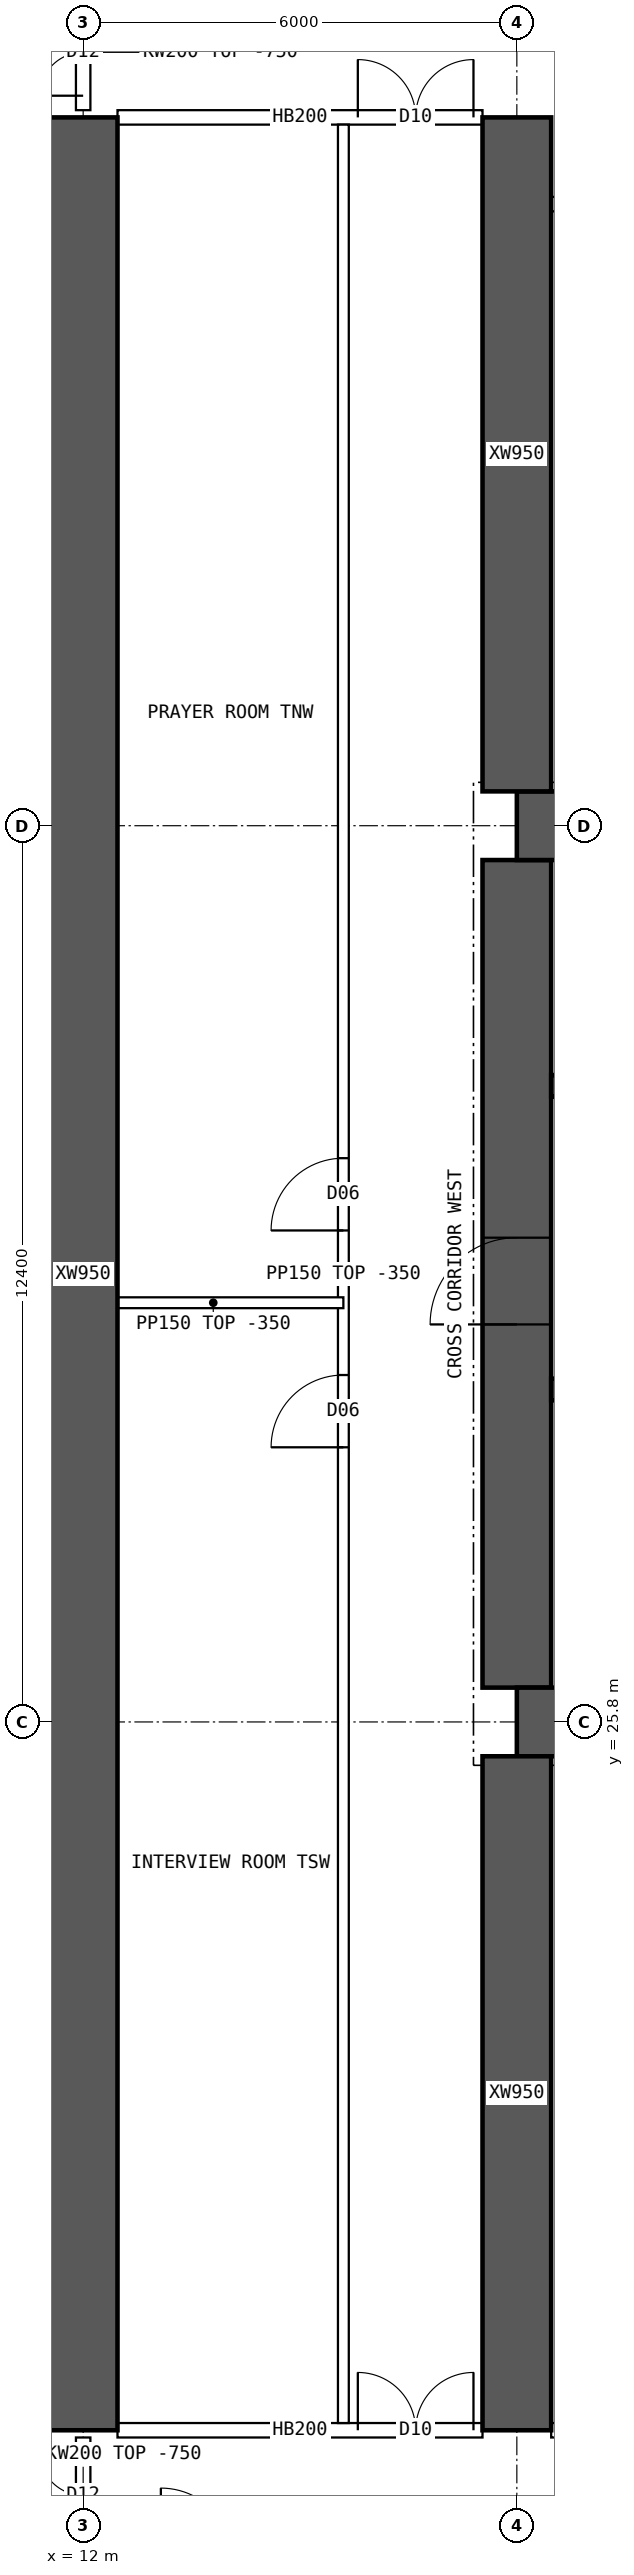
"""IFC4 building model, lengths in metres.
Left out: names, types, materials, properties, quantities, classifications, styles, units other than length and angle.
Written with IfcOpenShell. Run it as: python <this file> out.ifc"""

import sys

from ifc_helpers import new_model, si_unit, direction, frame, frame_2d, origin, place, context, subcontext, project, spatial, polyline, rectangle, outline, extrude, element, fill, save


model = new_model("IFC4")
c1 = context("Model", 3, precision=1e-05, world=origin(), true_north=direction((0.0, 1.0)))
c2 = subcontext(c1, "Body", "Model", "MODEL_VIEW")
j1 = project(units=[si_unit("LENGTHUNIT", "METRE"), si_unit("PLANEANGLEUNIT", "RADIAN")], contexts=[c1])
p1 = place(None, origin())
s1 = spatial("IfcSite", under=j1, at=p1, CompositionType="ELEMENT")
p2 = place(p1, origin())
s2 = spatial("IfcBuilding", under=s1, at=p2, CompositionType="ELEMENT")
p3 = place(p2, frame((0.0, 0.0, 129.4)))
s3 = spatial("IfcBuildingStorey", under=s2, at=p3, CompositionType="ELEMENT", Elevation=129.4)
for number, where, z_axis, x_axis in (
    (1, (18.0, 25.8, 0.0), (0.0, 0.0, 1.0), (1.0, 0.0, 0.0)),
    (2, (18.0, 38.2, 0.0), (0.0, 0.0, 1.0), (1.0, 0.0, 0.0)),
):
    element("IfcWall", number, at=place(p3, frame(where, z_axis=z_axis, x_axis=x_axis)), inside=s3, PredefinedType="SHEAR", context=c2, shape_type="SweptSolid", body=[
        extrude(rectangle(XDim=48.0, YDim=0.95, at=frame_2d((24.0, 0.0))), origin(), (0.0, 0.0, 1.0), 3.75),
    ])
p4 = place(p3, frame((18.0, 26.275, 0.0), z_axis=(0.0, 0.0, 1.0), x_axis=(0.0, 1.0, 0.0)))
e3 = element("IfcWall", 3, at=p4, inside=s3, PredefinedType="SHEAR", context=c2, shape_type="SweptSolid", body=[
    extrude(rectangle(XDim=11.45, YDim=0.95, at=frame_2d((5.725, 0.0))), origin(), (0.0, 0.0, 1.0), 3.75),
])
p5 = place(p4, frame((5.025, 0.0, 0.0)))
e4 = element("IfcOpeningElement", 4, at=p5, cuts=e3, PredefinedType="OPENING", context=c2, shape_type="SweptSolid", body=[
    extrude(rectangle(XDim=1.2, YDim=2.1, at=frame_2d((0.6, 1.05))), frame((0.0, 0.485, 0.0), z_axis=(0.0, -1.0, 0.0), x_axis=(1.0, 0.0, 0.0)), (0.0, 0.0, 1.0), 0.97),
])
p6 = place(p3, frame((18.475, 30.4, 0.0), z_axis=(0.0, 0.0, 1.0), x_axis=(1.0, 0.0, 0.0)))
e5 = element("IfcWall", 5, at=p6, inside=s3, PredefinedType="SHEAR", context=c2, shape_type="SweptSolid", body=[
    extrude(rectangle(XDim=47.05, YDim=0.3, at=frame_2d((23.525, 0.0))), origin(), (0.0, 0.0, 1.0), 3.75),
])
p7 = place(p6, frame((0.4, 0.0, 0.0)))
e6 = element("IfcOpeningElement", 6, at=p7, cuts=e5, PredefinedType="OPENING", context=c2, shape_type="SweptSolid", body=[
    extrude(rectangle(XDim=1.0, YDim=2.1, at=frame_2d((0.5, 1.05))), frame((0.0, 0.16, 0.0), z_axis=(0.0, -1.0, 0.0), x_axis=(1.0, 0.0, 0.0)), (0.0, 0.0, 1.0), 0.32),
])
p8 = place(p6, frame((45.65, 0.0, 0.0)))
e7 = element("IfcOpeningElement", 7, at=p8, cuts=e5, PredefinedType="OPENING", context=c2, shape_type="SweptSolid", body=[
    extrude(rectangle(XDim=1.0, YDim=2.1, at=frame_2d((0.5, 1.05))), frame((0.0, 0.16, 0.0), z_axis=(0.0, -1.0, 0.0), x_axis=(1.0, 0.0, 0.0)), (0.0, 0.0, 1.0), 0.32),
])
p9 = place(p6, frame((8.275, 0.0, 0.0)))
e8 = element("IfcOpeningElement", 8, at=p9, cuts=e5, PredefinedType="OPENING", context=c2, shape_type="SweptSolid", body=[
    extrude(rectangle(XDim=1.1, YDim=2.1, at=frame_2d((0.55, 1.05))), frame((0.0, 0.16, 0.0), z_axis=(0.0, -1.0, 0.0), x_axis=(1.0, 0.0, 0.0)), (0.0, 0.0, 1.0), 0.32),
])
p10 = place(p6, frame((10.875, 0.0, 0.0)))
e9 = element("IfcOpeningElement", 9, at=p10, cuts=e5, PredefinedType="OPENING", context=c2, shape_type="SweptSolid", body=[
    extrude(rectangle(XDim=1.1, YDim=2.1, at=frame_2d((0.55, 1.05))), frame((0.0, 0.16, 0.0), z_axis=(0.0, -1.0, 0.0), x_axis=(1.0, 0.0, 0.0)), (0.0, 0.0, 1.0), 0.32),
])
p11 = place(p6, frame((13.475, 0.0, 0.0)))
e10 = element("IfcOpeningElement", 10, at=p11, cuts=e5, PredefinedType="OPENING", context=c2, shape_type="SweptSolid", body=[
    extrude(rectangle(XDim=1.1, YDim=2.1, at=frame_2d((0.55, 1.05))), frame((0.0, 0.16, 0.0), z_axis=(0.0, -1.0, 0.0), x_axis=(1.0, 0.0, 0.0)), (0.0, 0.0, 1.0), 0.32),
])
p12 = place(p6, frame((16.075, 0.0, 0.0)))
e11 = element("IfcOpeningElement", 11, at=p12, cuts=e5, PredefinedType="OPENING", context=c2, shape_type="SweptSolid", body=[
    extrude(rectangle(XDim=1.1, YDim=2.1, at=frame_2d((0.55, 1.05))), frame((0.0, 0.16, 0.0), z_axis=(0.0, -1.0, 0.0), x_axis=(1.0, 0.0, 0.0)), (0.0, 0.0, 1.0), 0.32),
])
p13 = place(p6, frame((18.85, 0.0, 0.0)))
e12 = element("IfcOpeningElement", 12, at=p13, cuts=e5, PredefinedType="OPENING", context=c2, shape_type="SweptSolid", body=[
    extrude(rectangle(XDim=0.9, YDim=2.1, at=frame_2d((0.45, 1.05))), frame((0.0, 0.16, 0.0), z_axis=(0.0, -1.0, 0.0), x_axis=(1.0, 0.0, 0.0)), (0.0, 0.0, 1.0), 0.32),
])
p14 = place(p6, frame((30.142, 0.0, 0.0)))
e13 = element("IfcOpeningElement", 13, at=p14, cuts=e5, PredefinedType="OPENING", context=c2, shape_type="SweptSolid", body=[
    extrude(rectangle(XDim=1.1, YDim=2.1, at=frame_2d((0.55, 1.05))), frame((0.0, 0.16, 0.0), z_axis=(0.0, -1.0, 0.0), x_axis=(1.0, 0.0, 0.0)), (0.0, 0.0, 1.0), 0.32),
])
p15 = place(p6, frame((33.675, 0.0, 0.0)))
e14 = element("IfcOpeningElement", 14, at=p15, cuts=e5, PredefinedType="OPENING", context=c2, shape_type="SweptSolid", body=[
    extrude(rectangle(XDim=1.1, YDim=2.1, at=frame_2d((0.55, 1.05))), frame((0.0, 0.16, 0.0), z_axis=(0.0, -1.0, 0.0), x_axis=(1.0, 0.0, 0.0)), (0.0, 0.0, 1.0), 0.32),
])
p16 = place(p6, frame((37.208, 0.0, 0.0)))
e15 = element("IfcOpeningElement", 15, at=p16, cuts=e5, PredefinedType="OPENING", context=c2, shape_type="SweptSolid", body=[
    extrude(rectangle(XDim=1.1, YDim=2.1, at=frame_2d((0.55, 1.05))), frame((0.0, 0.16, 0.0), z_axis=(0.0, -1.0, 0.0), x_axis=(1.0, 0.0, 0.0)), (0.0, 0.0, 1.0), 0.32),
])
p17 = place(p3, frame((18.475, 34.6, 0.0), z_axis=(0.0, 0.0, 1.0), x_axis=(1.0, 0.0, 0.0)))
e16 = element("IfcWall", 16, at=p17, inside=s3, PredefinedType="SHEAR", context=c2, shape_type="SweptSolid", body=[
    extrude(rectangle(XDim=47.05, YDim=0.3, at=frame_2d((23.525, 0.0))), origin(), (0.0, 0.0, 1.0), 3.75),
])
p18 = place(p17, frame((0.9, 0.0, 0.0)))
e17 = element("IfcOpeningElement", 17, at=p18, cuts=e16, PredefinedType="OPENING", context=c2, shape_type="SweptSolid", body=[
    extrude(rectangle(XDim=1.1, YDim=2.1, at=frame_2d((0.55, 1.05))), frame((0.0, 0.16, 0.0), z_axis=(0.0, -1.0, 0.0), x_axis=(1.0, 0.0, 0.0)), (0.0, 0.0, 1.0), 0.32),
])
p19 = place(p17, frame((45.05, 0.0, 0.0)))
e18 = element("IfcOpeningElement", 18, at=p19, cuts=e16, PredefinedType="OPENING", context=c2, shape_type="SweptSolid", body=[
    extrude(rectangle(XDim=1.1, YDim=2.1, at=frame_2d((0.55, 1.05))), frame((0.0, 0.16, 0.0), z_axis=(0.0, -1.0, 0.0), x_axis=(1.0, 0.0, 0.0)), (0.0, 0.0, 1.0), 0.32),
])
p20 = place(p17, frame((4.125, 0.0, 0.0)))
e19 = element("IfcOpeningElement", 19, at=p20, cuts=e16, PredefinedType="OPENING", context=c2, shape_type="SweptSolid", body=[
    extrude(rectangle(XDim=0.9, YDim=2.1, at=frame_2d((0.45, 1.05))), frame((0.0, 0.16, 0.0), z_axis=(0.0, -1.0, 0.0), x_axis=(1.0, 0.0, 0.0)), (0.0, 0.0, 1.0), 0.32),
])
p21 = place(p17, frame((42.025, 0.0, 0.0)))
e20 = element("IfcOpeningElement", 20, at=p21, cuts=e16, PredefinedType="OPENING", context=c2, shape_type="SweptSolid", body=[
    extrude(rectangle(XDim=0.9, YDim=2.1, at=frame_2d((0.45, 1.05))), frame((0.0, 0.16, 0.0), z_axis=(0.0, -1.0, 0.0), x_axis=(1.0, 0.0, 0.0)), (0.0, 0.0, 1.0), 0.32),
])
p22 = place(p17, frame((8.9, 0.0, 0.0)))
e21 = element("IfcOpeningElement", 21, at=p22, cuts=e16, PredefinedType="OPENING", context=c2, shape_type="SweptSolid", body=[
    extrude(rectangle(XDim=0.9, YDim=2.1, at=frame_2d((0.45, 1.05))), frame((0.0, 0.16, 0.0), z_axis=(0.0, -1.0, 0.0), x_axis=(1.0, 0.0, 0.0)), (0.0, 0.0, 1.0), 0.32),
])
p23 = place(p17, frame((12.874, 0.0, 0.0)))
e22 = element("IfcOpeningElement", 22, at=p23, cuts=e16, PredefinedType="OPENING", context=c2, shape_type="SweptSolid", body=[
    extrude(rectangle(XDim=0.9, YDim=2.1, at=frame_2d((0.45, 1.05))), frame((0.0, 0.16, 0.0), z_axis=(0.0, -1.0, 0.0), x_axis=(1.0, 0.0, 0.0)), (0.0, 0.0, 1.0), 0.32),
])
p24 = place(p17, frame((16.521, 0.0, 0.0)))
e23 = element("IfcOpeningElement", 23, at=p24, cuts=e16, PredefinedType="OPENING", context=c2, shape_type="SweptSolid", body=[
    extrude(rectangle(XDim=0.9, YDim=2.1, at=frame_2d((0.45, 1.05))), frame((0.0, 0.16, 0.0), z_axis=(0.0, -1.0, 0.0), x_axis=(1.0, 0.0, 0.0)), (0.0, 0.0, 1.0), 0.32),
])
p25 = place(p17, frame((20.28, 0.0, 0.0)))
e24 = element("IfcOpeningElement", 24, at=p25, cuts=e16, PredefinedType="OPENING", context=c2, shape_type="SweptSolid", body=[
    extrude(rectangle(XDim=0.9, YDim=2.1, at=frame_2d((0.45, 1.05))), frame((0.0, 0.16, 0.0), z_axis=(0.0, -1.0, 0.0), x_axis=(1.0, 0.0, 0.0)), (0.0, 0.0, 1.0), 0.32),
])
p26 = place(p17, frame((24.686, 0.0, 0.0)))
e25 = element("IfcOpeningElement", 25, at=p26, cuts=e16, PredefinedType="OPENING", context=c2, shape_type="SweptSolid", body=[
    extrude(rectangle(XDim=0.9, YDim=2.1, at=frame_2d((0.45, 1.05))), frame((0.0, 0.16, 0.0), z_axis=(0.0, -1.0, 0.0), x_axis=(1.0, 0.0, 0.0)), (0.0, 0.0, 1.0), 0.32),
])
p27 = place(p17, frame((27.483, 0.0, 0.0)))
e26 = element("IfcOpeningElement", 26, at=p27, cuts=e16, PredefinedType="OPENING", context=c2, shape_type="SweptSolid", body=[
    extrude(rectangle(XDim=0.9, YDim=2.1, at=frame_2d((0.45, 1.05))), frame((0.0, 0.16, 0.0), z_axis=(0.0, -1.0, 0.0), x_axis=(1.0, 0.0, 0.0)), (0.0, 0.0, 1.0), 0.32),
])
p28 = place(p17, frame((33.604, 0.0, 0.0)))
e27 = element("IfcOpeningElement", 27, at=p28, cuts=e16, PredefinedType="OPENING", context=c2, shape_type="SweptSolid", body=[
    extrude(rectangle(XDim=0.9, YDim=2.1, at=frame_2d((0.45, 1.05))), frame((0.0, 0.16, 0.0), z_axis=(0.0, -1.0, 0.0), x_axis=(1.0, 0.0, 0.0)), (0.0, 0.0, 1.0), 0.32),
])
p29 = place(p3, frame((12.0, 16.0, 0.0), z_axis=(0.0, 0.0, 1.0), x_axis=(0.0, 1.0, 0.0)))
e28 = element("IfcWall", 28, at=p29, inside=s3, PredefinedType="SHEAR", context=c2, shape_type="SweptSolid", body=[
    extrude(rectangle(XDim=32.0, YDim=0.95, at=frame_2d((16.0, 0.0))), origin(), (0.0, 0.0, 1.0), 3.75),
])
for number, where, z_axis, x_axis in (
    (29, (18.0, 16.0, 0.0), (0.0, 0.0, 1.0), (0.0, 1.0, 0.0)),
    (30, (18.0, 38.675, 0.0), (0.0, 0.0, 1.0), (0.0, 1.0, 0.0)),
):
    element("IfcWall", number, at=place(p3, frame(where, z_axis=z_axis, x_axis=x_axis)), inside=s3, PredefinedType="SHEAR", context=c2, shape_type="SweptSolid", body=[
        extrude(rectangle(XDim=9.325, YDim=0.95, at=frame_2d((4.663, 0.0))), origin(), (0.0, 0.0, 1.0), 3.75),
    ])
p30 = place(p3, frame((12.475, 16.0, 0.0), z_axis=(0.0, 0.0, 1.0), x_axis=(1.0, 0.0, 0.0)))
e31 = element("IfcWall", 31, at=p30, inside=s3, PredefinedType="SOLIDWALL", context=c2, shape_type="SweptSolid", body=[
    extrude(rectangle(XDim=5.05, YDim=0.2, at=frame_2d((2.525, 0.0))), origin(), (0.0, 0.0, 1.0), 3.4),
])
p31 = place(p30, frame((3.325, 0.0, 0.0)))
e32 = element("IfcOpeningElement", 32, at=p31, cuts=e31, PredefinedType="OPENING", context=c2, shape_type="SweptSolid", body=[
    extrude(rectangle(XDim=1.6, YDim=2.1, at=frame_2d((0.8, 1.05))), frame((0.0, 0.11, 0.0), z_axis=(0.0, -1.0, 0.0), x_axis=(1.0, 0.0, 0.0)), (0.0, 0.0, 1.0), 0.22),
])
p32 = place(p3, frame((18.475, 16.0, 0.0), z_axis=(0.0, 0.0, 1.0), x_axis=(1.0, 0.0, 0.0)))
e33 = element("IfcWall", 33, at=p32, inside=s3, PredefinedType="SOLIDWALL", context=c2, shape_type="SweptSolid", body=[
    extrude(rectangle(XDim=5.05, YDim=0.2, at=frame_2d((2.525, 0.0))), origin(), (0.0, 0.0, 1.0), 3.4),
])
p33 = place(p32, frame((0.35, 0.0, 0.0)))
e34 = element("IfcOpeningElement", 34, at=p33, cuts=e33, PredefinedType="OPENING", context=c2, shape_type="SweptSolid", body=[
    extrude(rectangle(XDim=0.9, YDim=2.1, at=frame_2d((0.45, 1.05))), frame((0.0, 0.11, 0.0), z_axis=(0.0, -1.0, 0.0), x_axis=(1.0, 0.0, 0.0)), (0.0, 0.0, 1.0), 0.22),
])
p34 = place(p32, frame((3.215, 0.0, 0.0)))
e35 = element("IfcOpeningElement", 35, at=p34, cuts=e33, PredefinedType="OPENING", context=c2, shape_type="SweptSolid", body=[
    extrude(rectangle(XDim=0.9, YDim=2.1, at=frame_2d((0.45, 1.05))), frame((0.0, 0.11, 0.0), z_axis=(0.0, -1.0, 0.0), x_axis=(1.0, 0.0, 0.0)), (0.0, 0.0, 1.0), 0.22),
])
p35 = place(p3, frame((12.475, 48.0, 0.0), z_axis=(0.0, 0.0, 1.0), x_axis=(1.0, 0.0, 0.0)))
e36 = element("IfcWall", 36, at=p35, inside=s3, PredefinedType="SOLIDWALL", context=c2, shape_type="SweptSolid", body=[
    extrude(rectangle(XDim=5.05, YDim=0.2, at=frame_2d((2.525, 0.0))), origin(), (0.0, 0.0, 1.0), 3.4),
])
p36 = place(p35, frame((3.325, 0.0, 0.0)))
e37 = element("IfcOpeningElement", 37, at=p36, cuts=e36, PredefinedType="OPENING", context=c2, shape_type="SweptSolid", body=[
    extrude(rectangle(XDim=1.6, YDim=2.1, at=frame_2d((0.8, 1.05))), frame((0.0, 0.11, 0.0), z_axis=(0.0, -1.0, 0.0), x_axis=(1.0, 0.0, 0.0)), (0.0, 0.0, 1.0), 0.22),
])
p37 = place(p3, frame((18.475, 46.8, 0.0), z_axis=(0.0, 0.0, 1.0), x_axis=(1.0, 0.0, 0.0)))
e38 = element("IfcWall", 38, at=p37, inside=s3, PredefinedType="SOLIDWALL", context=c2, shape_type="SweptSolid", body=[
    extrude(rectangle(XDim=5.05, YDim=0.2, at=frame_2d((2.525, 0.0))), origin(), (0.0, 0.0, 1.0), 3.4),
])
p38 = place(p37, frame((0.8, 0.0, 0.0)))
e39 = element("IfcOpeningElement", 39, at=p38, cuts=e38, PredefinedType="OPENING", context=c2, shape_type="SweptSolid", body=[
    extrude(rectangle(XDim=1.0, YDim=2.1, at=frame_2d((0.5, 1.05))), frame((0.0, 0.11, 0.0), z_axis=(0.0, -1.0, 0.0), x_axis=(1.0, 0.0, 0.0)), (0.0, 0.0, 1.0), 0.22),
])
p39 = place(p3, frame((15.6, 16.1, 0.0), z_axis=(0.0, 0.0, 1.0), x_axis=(0.0, 1.0, 0.0)))
e40 = element("IfcWall", 40, at=p39, inside=s3, PredefinedType="PARTITIONING", context=c2, shape_type="SweptSolid", body=[
    extrude(rectangle(XDim=31.8, YDim=0.15, at=frame_2d((15.9, 0.0))), origin(), (0.0, 0.0, 1.0), 3.4),
])
p40 = place(p39, frame((13.5, 0.0, 0.0)))
e41 = element("IfcOpeningElement", 41, at=p40, cuts=e40, PredefinedType="OPENING", context=c2, shape_type="SweptSolid", body=[
    extrude(rectangle(XDim=1.0, YDim=2.1, at=frame_2d((0.5, 1.05))), frame((0.0, 0.085, 0.0), z_axis=(0.0, -1.0, 0.0), x_axis=(1.0, 0.0, 0.0)), (0.0, 0.0, 1.0), 0.17),
])
p41 = place(p39, frame((16.5, 0.0, 0.0)))
e42 = element("IfcOpeningElement", 42, at=p41, cuts=e40, PredefinedType="OPENING", context=c2, shape_type="SweptSolid", body=[
    extrude(rectangle(XDim=1.0, YDim=2.1, at=frame_2d((0.5, 1.05))), frame((0.0, 0.085, 0.0), z_axis=(0.0, -1.0, 0.0), x_axis=(1.0, 0.0, 0.0)), (0.0, 0.0, 1.0), 0.17),
])
p42 = place(p3, frame((12.0, 31.6, 0.0), z_axis=(0.0, 0.0, 1.0), x_axis=(1.0, 0.0, 0.0)))
e43 = element("IfcWall", 43, at=p42, inside=s3, PredefinedType="PARTITIONING", context=c2, shape_type="SweptSolid", body=[
    extrude(rectangle(XDim=3.6, YDim=0.15, at=frame_2d((1.8, 0.0))), origin(), (0.0, 0.0, 1.0), 3.4),
])
p43 = place(p3, frame((3.905, 30.85, 0.0), z_axis=(0.0, 0.0, 1.0), x_axis=(1.0, 0.0, 0.0)))
e44 = element("IfcWall", 44, at=p43, inside=s3, PredefinedType="PARTITIONING", context=c2, shape_type="SweptSolid", body=[
    extrude(outline(polyline([(0.0, 0.0), (8.02, 0.0), (8.02, 3.4), (2.397, 3.4), (2.395, 2.95), (1.797, 2.95), (1.795, 3.4), (0.0, 3.4), (0.0, 0.0)])), frame((0.0, 0.075, 0.0), z_axis=(0.0, -1.0, 0.0), x_axis=(1.0, 0.0, 0.0)), (0.0, 0.0, 1.0), 0.15),
])
p44 = place(p3, frame((12.0, 14.3, 0.0), z_axis=(0.0, 0.0, 1.0), x_axis=(0.0, 1.0, 0.0)))
e45 = element("IfcWall", 45, at=p44, inside=s3, PredefinedType="SOLIDWALL", context=c2, shape_type="SweptSolid", body=[
    extrude(outline(polyline([(0.0, 0.0), (1.6, 0.0), (1.6, 3.0), (0.0, 3.0), (0.0, 0.0)])), frame((0.0, 0.1, 0.0), z_axis=(0.0, -1.0, 0.0), x_axis=(1.0, 0.0, 0.0)), (0.0, 0.0, 1.0), 0.2),
])
p45 = place(p44, frame((0.2, 0.0, 0.0)))
e46 = element("IfcOpeningElement", 46, at=p45, cuts=e45, PredefinedType="OPENING", context=c2, shape_type="SweptSolid", body=[
    extrude(rectangle(XDim=1.2, YDim=2.1, at=frame_2d((0.6, 1.05))), frame((0.0, 0.11, 0.0), z_axis=(0.0, -1.0, 0.0), x_axis=(1.0, 0.0, 0.0)), (0.0, 0.0, 1.0), 0.22),
])
p46 = place(p3, frame((12.0, 48.1, 0.0), z_axis=(0.0, 0.0, 1.0), x_axis=(0.0, 1.0, 0.0)))
e47 = element("IfcWall", 47, at=p46, inside=s3, PredefinedType="SOLIDWALL", context=c2, shape_type="SweptSolid", body=[
    extrude(outline(polyline([(0.0, 0.0), (1.6, 0.0), (1.6, 3.0), (0.0, 3.0), (0.0, 0.0)])), frame((0.0, 0.1, 0.0), z_axis=(0.0, -1.0, 0.0), x_axis=(1.0, 0.0, 0.0)), (0.0, 0.0, 1.0), 0.2),
])
p47 = place(p46, frame((0.2, 0.0, 0.0)))
e48 = element("IfcOpeningElement", 48, at=p47, cuts=e47, PredefinedType="OPENING", context=c2, shape_type="SweptSolid", body=[
    extrude(rectangle(XDim=1.2, YDim=2.1, at=frame_2d((0.6, 1.05))), frame((0.0, 0.11, 0.0), z_axis=(0.0, -1.0, 0.0), x_axis=(1.0, 0.0, 0.0)), (0.0, 0.0, 1.0), 0.22),
])
p48 = place(p5, origin())
e49 = element("IfcDoor", 49, at=p48, inside=s3, OperationType="SINGLE_SWING_LEFT", PredefinedType="DOOR", context=c2, shape_type="SweptSolid", body=[
    extrude(rectangle(XDim=1.2, YDim=2.1, at=frame_2d((0.6, 1.05))), frame((0.0, 0.025, 0.0), z_axis=(0.0, -1.0, 0.0), x_axis=(1.0, 0.0, 0.0)), (0.0, 0.0, 1.0), 0.05),
])
fill(e4, e49)
p49 = place(p31, origin())
e50 = element("IfcDoor", 50, at=p49, inside=s3, OperationType="DOUBLE_DOOR_SINGLE_SWING", PredefinedType="DOOR", context=c2, shape_type="SweptSolid", body=[
    extrude(rectangle(XDim=1.6, YDim=2.1, at=frame_2d((0.8, 1.05))), frame((0.0, 0.025, 0.0), z_axis=(0.0, -1.0, 0.0), x_axis=(1.0, 0.0, 0.0)), (0.0, 0.0, 1.0), 0.05),
])
fill(e32, e50)
p50 = place(p36, origin())
e51 = element("IfcDoor", 51, at=p50, inside=s3, OperationType="DOUBLE_DOOR_SINGLE_SWING", PredefinedType="DOOR", context=c2, shape_type="SweptSolid", body=[
    extrude(rectangle(XDim=1.6, YDim=2.1, at=frame_2d((0.8, 1.05))), frame((0.0, 0.025, 0.0), z_axis=(0.0, -1.0, 0.0), x_axis=(1.0, 0.0, 0.0)), (0.0, 0.0, 1.0), 0.05),
])
fill(e37, e51)
p51 = place(p40, origin())
e52 = element("IfcDoor", 52, at=p51, inside=s3, OperationType="SINGLE_SWING_LEFT", PredefinedType="DOOR", context=c2, shape_type="SweptSolid", body=[
    extrude(rectangle(XDim=1.0, YDim=2.1, at=frame_2d((0.5, 1.05))), frame((0.0, 0.025, 0.0), z_axis=(0.0, -1.0, 0.0), x_axis=(1.0, 0.0, 0.0)), (0.0, 0.0, 1.0), 0.05),
])
fill(e41, e52)
p52 = place(p41, origin())
e53 = element("IfcDoor", 53, at=p52, inside=s3, OperationType="SINGLE_SWING_LEFT", PredefinedType="DOOR", context=c2, shape_type="SweptSolid", body=[
    extrude(rectangle(XDim=1.0, YDim=2.1, at=frame_2d((0.5, 1.05))), frame((0.0, 0.025, 0.0), z_axis=(0.0, -1.0, 0.0), x_axis=(1.0, 0.0, 0.0)), (0.0, 0.0, 1.0), 0.05),
])
fill(e42, e53)
p53 = place(p45, origin())
e54 = element("IfcDoor", 54, at=p53, inside=s3, OperationType="DOUBLE_DOOR_SINGLE_SWING", PredefinedType="DOOR", context=c2, shape_type="SweptSolid", body=[
    extrude(rectangle(XDim=1.2, YDim=2.1, at=frame_2d((0.6, 1.05))), frame((0.0, 0.025, 0.0), z_axis=(0.0, -1.0, 0.0), x_axis=(1.0, 0.0, 0.0)), (0.0, 0.0, 1.0), 0.05),
])
fill(e46, e54)
p54 = place(p47, origin())
e55 = element("IfcDoor", 55, at=p54, inside=s3, OperationType="DOUBLE_DOOR_SINGLE_SWING", PredefinedType="DOOR", context=c2, shape_type="SweptSolid", body=[
    extrude(rectangle(XDim=1.2, YDim=2.1, at=frame_2d((0.6, 1.05))), frame((0.0, 0.025, 0.0), z_axis=(0.0, -1.0, 0.0), x_axis=(1.0, 0.0, 0.0)), (0.0, 0.0, 1.0), 0.05),
])
fill(e48, e55)
save(model, sys.argv[1])
